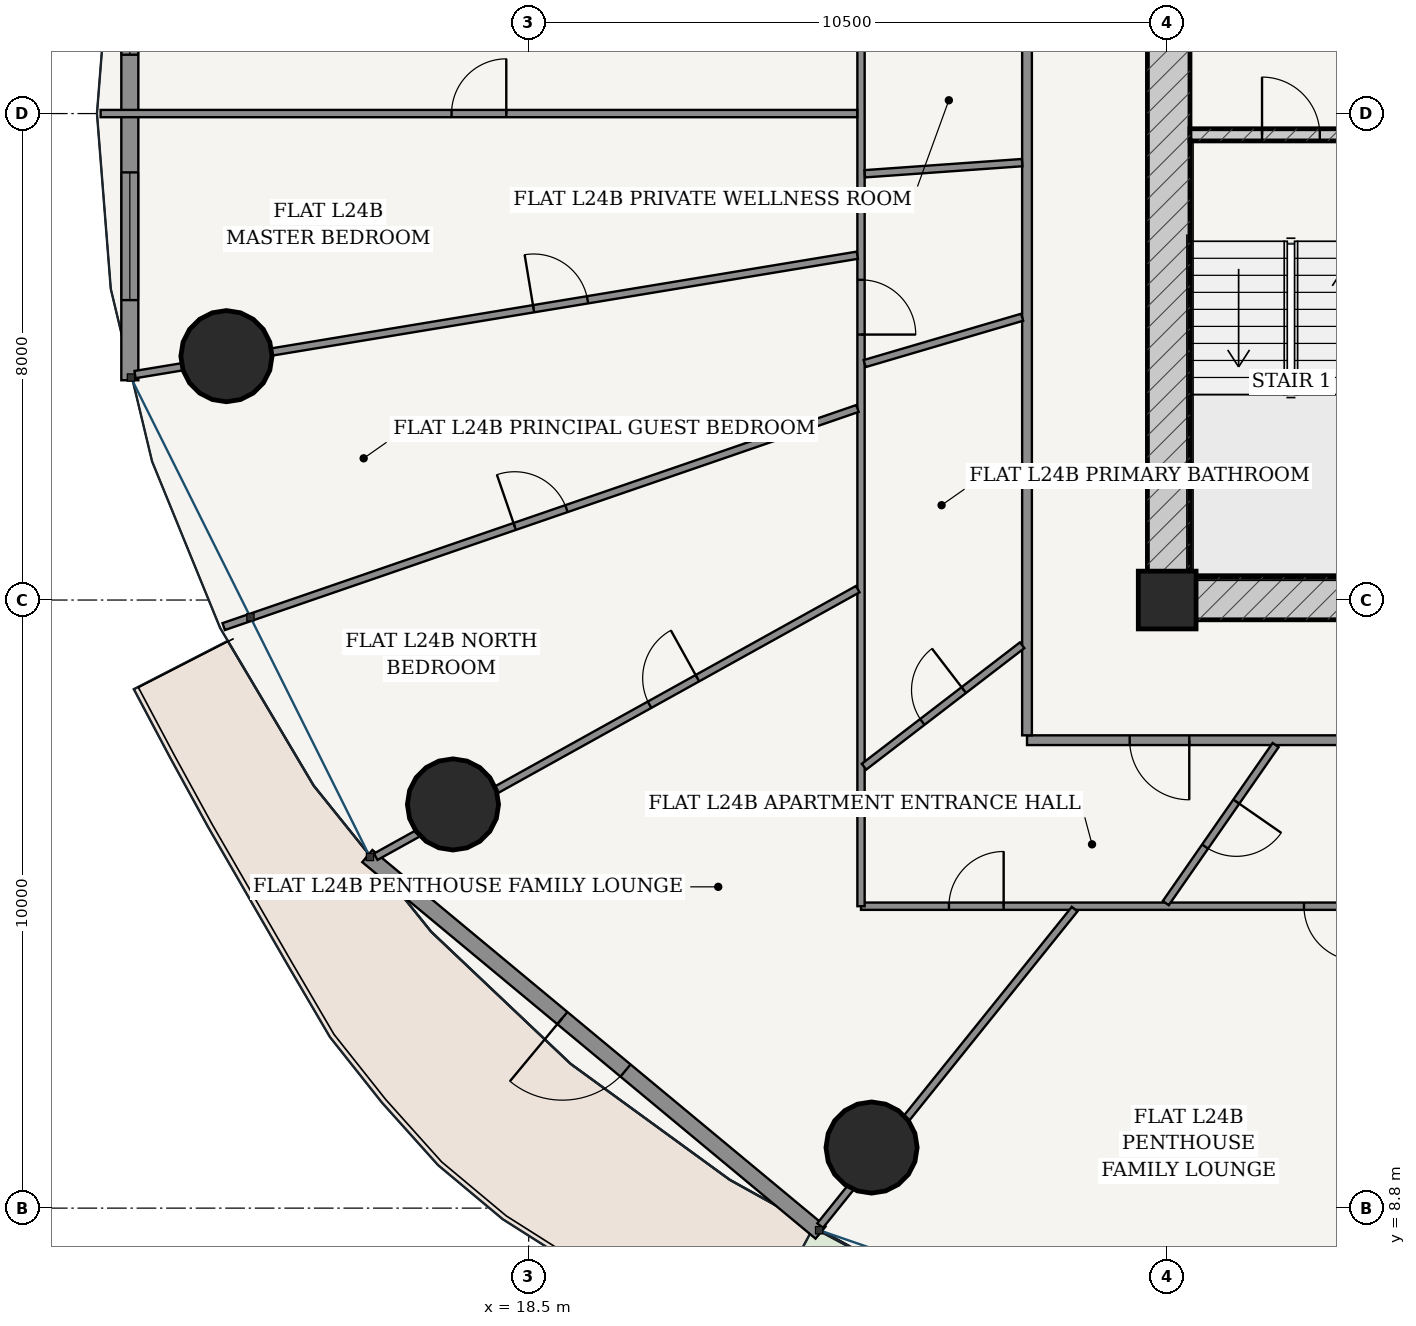
"""IFC4 building model, lengths in metres.
Left out: names, types, materials, properties, quantities, classifications, styles, units other than length and angle.
Written with IfcOpenShell. Run it as: python <this file> out.ifc"""

import sys

from ifc_helpers import new_model, si_unit, direction, frame, frame_2d, origin, origin_2d, place, context, subcontext, project, spatial, rectangle, hollow_circle, extrude, source, transform, mapped, element, fill, save


model = new_model("IFC4")
c1 = context("Model", 3, precision=1e-05, world=origin(), true_north=direction((-0.2419218956, 0.970295726276)))
c2 = subcontext(c1, "Body", "Model", "MODEL_VIEW")
j1 = project(units=[si_unit("LENGTHUNIT", "METRE"), si_unit("PLANEANGLEUNIT", "RADIAN")], contexts=[c1])
p1 = place(None, origin())
s1 = spatial("IfcSite", under=j1, at=p1, CompositionType="ELEMENT")
p2 = place(p1, origin())
s2 = spatial("IfcBuilding", under=s1, at=p2, CompositionType="ELEMENT")
p3 = place(p2, frame((0.0, 0.0, 94.2)))
s3 = spatial("IfcBuildingStorey", under=s2, at=p3, CompositionType="ELEMENT", Elevation=94.2)
p4 = place(p3, frame((29.0, 18.8, 0.0), z_axis=(0.0, 0.0, 1.0), x_axis=(1.0, 0.0, 0.0)))
e1 = element("IfcColumn", 1, at=p4, inside=s3, PredefinedType="COLUMN", context=c2, shape_type="SweptSolid", body=[
    extrude(rectangle(XDim=0.95, YDim=0.95, at=origin_2d()), origin(), (0.0, 0.0, 1.0), 3.6),
])
p5 = place(p3, frame((28.675, 18.825, 0.0), z_axis=(0.0, 0.0, 1.0), x_axis=(1.0, 0.0, 0.0)))
e2 = element("IfcWall", 2, at=p5, inside=s3, PredefinedType="SHEAR", context=c2, shape_type="SweptSolid", body=[
    extrude(rectangle(XDim=18.65, YDim=0.7, at=frame_2d((9.325, 0.0))), origin(), (0.0, 0.0, 1.0), 3.325),
])
p6 = place(p5, frame((8.9, 0.0, 0.0)))
e3 = element("IfcOpeningElement", 3, at=p6, cuts=e2, PredefinedType="OPENING", context=c2, shape_type="SweptSolid", body=[
    extrude(rectangle(XDim=0.85, YDim=2.1, at=frame_2d((0.425, 1.05))), frame((0.0, 0.36, 0.0), z_axis=(0.0, -1.0, 0.0), x_axis=(1.0, 0.0, 0.0)), (0.0, 0.0, 1.0), 0.72),
])
p7 = place(p3, frame((29.025, 19.175, 0.0), z_axis=(0.0, 0.0, 1.0), x_axis=(0.0, 1.0, 0.0)))
e4 = element("IfcWall", 4, at=p7, inside=s3, PredefinedType="SHEAR", context=c2, shape_type="SweptSolid", body=[
    extrude(rectangle(XDim=15.25, YDim=0.7, at=frame_2d((7.625, 0.0))), origin(), (0.0, 0.0, 1.0), 3.325),
])
p8 = place(p7, frame((9.875, 0.0, 0.0)))
e5 = element("IfcOpeningElement", 5, at=p8, cuts=e4, PredefinedType="OPENING", context=c2, shape_type="SweptSolid", body=[
    extrude(rectangle(XDim=1.5, YDim=2.2, at=frame_2d((0.75, 1.1))), frame((0.0, 0.36, 0.0), z_axis=(0.0, -1.0, 0.0), x_axis=(1.0, 0.0, 0.0)), (0.0, 0.0, 1.0), 0.72),
])
p9 = place(p3, frame((29.375, 26.45, 0.0), z_axis=(0.0, 0.0, 1.0), x_axis=(1.0, 0.0, 0.0)))
e6 = element("IfcWall", 6, at=p9, inside=s3, PredefinedType="SOLIDWALL", context=c2, shape_type="SweptSolid", body=[
    extrude(rectangle(XDim=3.32, YDim=0.2, at=frame_2d((1.66, 0.0))), origin(), (0.0, 0.0, 1.0), 3.325),
])
p10 = place(p9, frame((1.185, 0.0, 0.0)))
e7 = element("IfcOpeningElement", 7, at=p10, cuts=e6, PredefinedType="OPENING", context=c2, shape_type="SweptSolid", body=[
    extrude(rectangle(XDim=0.95, YDim=2.15, at=frame_2d((0.475, 1.075))), frame((0.0, 0.11, 0.0), z_axis=(0.0, -1.0, 0.0), x_axis=(1.0, 0.0, 0.0)), (0.0, 0.0, 1.0), 0.22),
])
for number, where, z_axis, x_axis in (
    (8, (13.529, 22.81, 0.0), (0.0, 0.0, 1.0), (1.0, 0.0, 0.0)),
    (9, (17.255, 15.438, 0.0), (0.0, 0.0, 1.0), (1.0, 0.0, 0.0)),
    (10, (24.138, 9.796, 0.0), (0.0, 0.0, 1.0), (1.0, 0.0, 0.0)),
):
    element("IfcColumn", number, at=place(p3, frame(where, z_axis=z_axis, x_axis=x_axis)), inside=s3, PredefinedType="COLUMN", context=c2, shape_type="SweptSolid", body=[
        extrude(hollow_circle(Radius=0.75, WallThickness=0.045, at=origin_2d()), origin(), (0.0, 0.0, 1.0), 3.6),
    ])
p11 = place(p3, frame((11.94, 31.186, 0.0), z_axis=(0.0, 0.0, 1.0), x_axis=(0.0, -1.0, 0.0)))
e11 = element("IfcWall", 11, at=p11, inside=s3, PredefinedType="SOLIDWALL", context=c2, shape_type="SweptSolid", body=[
    extrude(rectangle(XDim=8.771, YDim=0.28, at=frame_2d((4.386, 0.0))), origin(), (0.0, 0.0, 1.0), 3.325),
])
p12 = place(p11, frame((1.318, 0.0, 0.85)))
e12 = element("IfcOpeningElement", 12, at=p12, cuts=e11, PredefinedType="OPENING", context=c2, shape_type="SweptSolid", body=[
    extrude(rectangle(XDim=2.1, YDim=1.95, at=frame_2d((1.05, 0.975))), frame((0.0, 0.15, 0.0), z_axis=(0.0, -1.0, 0.0), x_axis=(1.0, 0.0, 0.0)), (0.0, 0.0, 1.0), 0.3),
])
p13 = place(p11, frame((5.353, 0.0, 0.85)))
e13 = element("IfcOpeningElement", 13, at=p13, cuts=e11, PredefinedType="OPENING", context=c2, shape_type="SweptSolid", body=[
    extrude(rectangle(XDim=2.1, YDim=1.95, at=frame_2d((1.05, 0.975))), frame((0.0, 0.15, 0.0), z_axis=(0.0, -1.0, 0.0), x_axis=(1.0, 0.0, 0.0)), (0.0, 0.0, 1.0), 0.3),
])
p14 = place(p3, frame((15.846, 14.59, 0.0), z_axis=(0.0, 0.0, 1.0), x_axis=(0.769254958887, -0.638941944333, 0.0)))
e14 = element("IfcWall", 14, at=p14, inside=s3, PredefinedType="SOLIDWALL", context=c2, shape_type="SweptSolid", body=[
    extrude(rectangle(XDim=9.69, YDim=0.26, at=frame_2d((4.845, 0.0))), origin(), (0.0, 0.0, 1.0), 3.325),
])
p15 = place(p14, frame((4.17, 0.0, 0.0)))
e15 = element("IfcOpeningElement", 15, at=p15, cuts=e14, PredefinedType="OPENING", context=c2, shape_type="SweptSolid", body=[
    extrude(rectangle(XDim=1.35, YDim=2.2, at=frame_2d((0.675, 1.1))), frame((0.0, 0.14, 0.0), z_axis=(0.0, -1.0, 0.0), x_axis=(1.0, 0.0, 0.0)), (0.0, 0.0, 1.0), 0.28),
])
p16 = place(p3, frame((26.695, 16.495, 0.0), z_axis=(0.0, 0.0, 1.0), x_axis=(1.0, 0.0, 0.0)))
e16 = element("IfcWall", 16, at=p16, inside=s3, PredefinedType="PARTITIONING", context=c2, shape_type="SweptSolid", body=[
    extrude(rectangle(XDim=22.61, YDim=0.16, at=frame_2d((11.305, 0.0))), origin(), (0.0, 0.0, 1.0), 2.767),
])
p17 = place(p16, frame((1.688, 0.0, 0.0)))
e17 = element("IfcOpeningElement", 17, at=p17, cuts=e16, PredefinedType="OPENING", context=c2, shape_type="SweptSolid", body=[
    extrude(rectangle(XDim=0.98, YDim=2.2, at=frame_2d((0.49, 1.1))), frame((0.0, 0.09, 0.0), z_axis=(0.0, -1.0, 0.0), x_axis=(1.0, 0.0, 0.0)), (0.0, 0.0, 1.0), 0.18),
])
p18 = place(p16, frame((16.137, 0.0, 0.0)))
e18 = element("IfcOpeningElement", 18, at=p18, cuts=e16, PredefinedType="OPENING", context=c2, shape_type="SweptSolid", body=[
    extrude(rectangle(XDim=0.98, YDim=2.2, at=frame_2d((0.49, 1.1))), frame((0.0, 0.09, 0.0), z_axis=(0.0, -1.0, 0.0), x_axis=(1.0, 0.0, 0.0)), (0.0, 0.0, 1.0), 0.18),
])
p19 = place(p3, frame((26.695, 16.575, 0.0), z_axis=(0.0, 0.0, 1.0), x_axis=(0.0, 1.0, 0.0)))
e19 = element("IfcWall", 19, at=p19, inside=s3, PredefinedType="PARTITIONING", context=c2, shape_type="SweptSolid", body=[
    extrude(rectangle(XDim=20.45, YDim=0.16, at=frame_2d((10.225, 0.0))), origin(), (0.0, 0.0, 1.0), 2.767),
])
p20 = place(p3, frame((34.777, 13.765, 0.0), z_axis=(0.0, 0.0, 1.0), x_axis=(-1.0, 0.0, 0.0)))
e20 = element("IfcWall", 20, at=p20, inside=s3, PredefinedType="PARTITIONING", context=c2, shape_type="SweptSolid", body=[
    extrude(rectangle(XDim=10.812, YDim=0.12, at=frame_2d((5.406, 0.0))), origin(), (0.0, 0.0, 1.0), 2.767),
])
p21 = place(p20, frame((8.466, 0.0, 0.0)))
e21 = element("IfcOpeningElement", 21, at=p21, cuts=e20, PredefinedType="OPENING", context=c2, shape_type="SweptSolid", body=[
    extrude(rectangle(XDim=0.9, YDim=2.15, at=frame_2d((0.45, 1.075))), frame((0.0, 0.07, 0.0), z_axis=(0.0, -1.0, 0.0), x_axis=(1.0, 0.0, 0.0)), (0.0, 0.0, 1.0), 0.14),
])
p22 = place(p20, frame((2.628, 0.0, 0.0)))
e22 = element("IfcOpeningElement", 22, at=p22, cuts=e20, PredefinedType="OPENING", context=c2, shape_type="SweptSolid", body=[
    extrude(rectangle(XDim=0.9, YDim=2.15, at=frame_2d((0.45, 1.075))), frame((0.0, 0.07, 0.0), z_axis=(0.0, -1.0, 0.0), x_axis=(1.0, 0.0, 0.0)), (0.0, 0.0, 1.0), 0.14),
])
p23 = place(p3, frame((23.965, 13.765, 0.0), z_axis=(0.0, 0.0, 1.0), x_axis=(0.0, 1.0, 0.0)))
e23 = element("IfcWall", 23, at=p23, inside=s3, PredefinedType="PARTITIONING", context=c2, shape_type="SweptSolid", body=[
    extrude(rectangle(XDim=20.725, YDim=0.12, at=frame_2d((10.362, 0.0))), origin(), (0.0, 0.0, 1.0), 2.767),
])
p24 = place(p23, frame((9.401, 0.0, 0.0)))
e24 = element("IfcOpeningElement", 24, at=p24, cuts=e23, PredefinedType="OPENING", context=c2, shape_type="SweptSolid", body=[
    extrude(rectangle(XDim=0.9, YDim=2.15, at=frame_2d((0.45, 1.075))), frame((0.0, 0.07, 0.0), z_axis=(0.0, -1.0, 0.0), x_axis=(1.0, 0.0, 0.0)), (0.0, 0.0, 1.0), 0.14),
])
p25 = place(p23, frame((18.157, 0.0, 0.0)))
e25 = element("IfcOpeningElement", 25, at=p25, cuts=e23, PredefinedType="OPENING", context=c2, shape_type="SweptSolid", body=[
    extrude(rectangle(XDim=0.86, YDim=2.15, at=frame_2d((0.43, 1.075))), frame((0.0, 0.07, 0.0), z_axis=(0.0, -1.0, 0.0), x_axis=(1.0, 0.0, 0.0)), (0.0, 0.0, 1.0), 0.14),
])
p26 = place(p23, frame((14.376, 0.0, 0.0)))
e26 = element("IfcOpeningElement", 26, at=p26, cuts=e23, PredefinedType="OPENING", context=c2, shape_type="SweptSolid", body=[
    extrude(rectangle(XDim=0.9, YDim=2.15, at=frame_2d((0.45, 1.075))), frame((0.0, 0.07, 0.0), z_axis=(0.0, -1.0, 0.0), x_axis=(1.0, 0.0, 0.0)), (0.0, 0.0, 1.0), 0.14),
])
p27 = place(p3, frame((23.903, 26.8, 0.0), z_axis=(0.0, 0.0, 1.0), x_axis=(-1.0, 0.0, 0.0)))
e27 = element("IfcWall", 27, at=p27, inside=s3, PredefinedType="PARTITIONING", context=c2, shape_type="SweptSolid", body=[
    extrude(rectangle(XDim=12.443, YDim=0.12, at=frame_2d((6.222, 0.0))), origin(), (0.0, 0.0, 1.0), 2.767),
])
p28 = place(p27, frame((5.771, 0.0, 0.0)))
e28 = element("IfcOpeningElement", 28, at=p28, cuts=e27, PredefinedType="OPENING", context=c2, shape_type="SweptSolid", body=[
    extrude(rectangle(XDim=0.9, YDim=2.15, at=frame_2d((0.45, 1.075))), frame((0.0, 0.07, 0.0), z_axis=(0.0, -1.0, 0.0), x_axis=(1.0, 0.0, 0.0)), (0.0, 0.0, 1.0), 0.14),
])
p29 = place(p3, frame((23.904, 24.47, 0.0), z_axis=(0.0, 0.0, 1.0), x_axis=(-0.986618264768, -0.163047231274, 0.0)))
e29 = element("IfcWall", 29, at=p29, inside=s3, PredefinedType="PARTITIONING", context=c2, shape_type="SweptSolid", body=[
    extrude(rectangle(XDim=12.039, YDim=0.12, at=frame_2d((6.02, 0.0))), origin(), (0.0, 0.0, 1.0), 2.767),
])
p30 = place(p29, frame((4.496, 0.0, 0.0)))
e30 = element("IfcOpeningElement", 30, at=p30, cuts=e29, PredefinedType="OPENING", context=c2, shape_type="SweptSolid", body=[
    extrude(rectangle(XDim=0.9, YDim=2.15, at=frame_2d((0.45, 1.075))), frame((0.0, 0.07, 0.0), z_axis=(0.0, -1.0, 0.0), x_axis=(1.0, 0.0, 0.0)), (0.0, 0.0, 1.0), 0.14),
])
p31 = place(p3, frame((23.906, 21.95, 0.0), z_axis=(0.0, 0.0, 1.0), x_axis=(-0.945573120726, -0.32540970078, 0.0)))
e31 = element("IfcWall", 31, at=p31, inside=s3, PredefinedType="PARTITIONING", context=c2, shape_type="SweptSolid", body=[
    extrude(rectangle(XDim=11.022, YDim=0.12, at=frame_2d((5.511, 0.0))), origin(), (0.0, 0.0, 1.0), 2.767),
])
p32 = place(p31, frame((5.061, 0.0, 0.0)))
e32 = element("IfcOpeningElement", 32, at=p32, cuts=e31, PredefinedType="OPENING", context=c2, shape_type="SweptSolid", body=[
    extrude(rectangle(XDim=0.9, YDim=2.15, at=frame_2d((0.45, 1.075))), frame((0.0, 0.07, 0.0), z_axis=(0.0, -1.0, 0.0), x_axis=(1.0, 0.0, 0.0)), (0.0, 0.0, 1.0), 0.14),
])
p33 = place(p3, frame((23.911, 18.979, 0.0), z_axis=(0.0, 0.0, 1.0), x_axis=(-0.874313476423, -0.485361664066, 0.0)))
e33 = element("IfcWall", 33, at=p33, inside=s3, PredefinedType="PARTITIONING", context=c2, shape_type="SweptSolid", body=[
    extrude(rectangle(XDim=9.066, YDim=0.12, at=frame_2d((4.533, 0.0))), origin(), (0.0, 0.0, 1.0), 2.767),
])
p34 = place(p33, frame((3.016, 0.0, 0.0)))
e34 = element("IfcOpeningElement", 34, at=p34, cuts=e33, PredefinedType="OPENING", context=c2, shape_type="SweptSolid", body=[
    extrude(rectangle(XDim=0.9, YDim=2.15, at=frame_2d((0.45, 1.075))), frame((0.0, 0.07, 0.0), z_axis=(0.0, -1.0, 0.0), x_axis=(1.0, 0.0, 0.0)), (0.0, 0.0, 1.0), 0.14),
])
p35 = place(p3, frame((27.478, 13.717, 0.0), z_axis=(0.0, 0.0, 1.0), x_axis=(-0.626707979732, -0.77925419995, 0.0)))
e35 = element("IfcWall", 35, at=p35, inside=s3, PredefinedType="PARTITIONING", context=c2, shape_type="SweptSolid", body=[
    extrude(rectangle(XDim=6.679, YDim=0.12, at=frame_2d((3.339, 0.0))), origin(), (0.0, 0.0, 1.0), 2.767),
])
p36 = place(p3, frame((26.615, 25.993, 0.0), z_axis=(0.0, 0.0, 1.0), x_axis=(-0.997500084777, -0.070665273433, 0.0)))
e36 = element("IfcWall", 36, at=p36, inside=s3, PredefinedType="PARTITIONING", context=c2, shape_type="SweptSolid", body=[
    extrude(rectangle(XDim=2.595, YDim=0.12, at=frame_2d((1.297, 0.0))), origin(), (0.0, 0.0, 1.0), 3.325),
])
p37 = place(p3, frame((26.615, 23.45, 0.0), z_axis=(0.0, 0.0, 1.0), x_axis=(-0.959338143787, -0.282259323806, 0.0)))
e37 = element("IfcWall", 37, at=p37, inside=s3, PredefinedType="PARTITIONING", context=c2, shape_type="SweptSolid", body=[
    extrude(rectangle(XDim=2.7, YDim=0.12, at=frame_2d((1.35, 0.0))), origin(), (0.0, 0.0, 1.0), 3.325),
])
p38 = place(p3, frame((26.615, 18.056, 0.0), z_axis=(0.0, 0.0, 1.0), x_axis=(-0.79311360735, -0.609073727751, 0.0)))
e38 = element("IfcWall", 38, at=p38, inside=s3, PredefinedType="PARTITIONING", context=c2, shape_type="SweptSolid", body=[
    extrude(rectangle(XDim=3.279, YDim=0.12, at=frame_2d((1.64, 0.0))), origin(), (0.0, 0.0, 1.0), 3.004),
])
p39 = place(p38, frame((1.21, 0.0, 0.0)))
e39 = element("IfcOpeningElement", 39, at=p39, cuts=e38, PredefinedType="OPENING", context=c2, shape_type="SweptSolid", body=[
    extrude(rectangle(XDim=0.86, YDim=2.15, at=frame_2d((0.43, 1.075))), frame((0.0, 0.07, 0.0), z_axis=(0.0, -1.0, 0.0), x_axis=(1.0, 0.0, 0.0)), (0.0, 0.0, 1.0), 0.14),
])
p40 = place(p3, frame((30.783, 16.415, 0.0), z_axis=(0.0, 0.0, 1.0), x_axis=(-0.570653089326, -0.821191239385, 0.0)))
e40 = element("IfcWall", 40, at=p40, inside=s3, PredefinedType="PARTITIONING", context=c2, shape_type="SweptSolid", body=[
    extrude(rectangle(XDim=3.165, YDim=0.12, at=frame_2d((1.583, 0.0))), origin(), (0.0, 0.0, 1.0), 3.004),
])
p41 = place(p40, frame((1.133, 0.0, 0.0)))
e41 = element("IfcOpeningElement", 41, at=p41, cuts=e40, PredefinedType="OPENING", context=c2, shape_type="SweptSolid", body=[
    extrude(rectangle(XDim=0.9, YDim=2.15, at=frame_2d((0.45, 1.075))), frame((0.0, 0.07, 0.0), z_axis=(0.0, -1.0, 0.0), x_axis=(1.0, 0.0, 0.0)), (0.0, 0.0, 1.0), 0.14),
])
m1 = source(origin(), c2, "Body", "SweptSolid", [
    extrude(rectangle(XDim=2.1, YDim=1.95, at=frame_2d((1.05, 0.975))), frame((0.0, 0.03, 0.0), z_axis=(0.0, -1.0, 0.0), x_axis=(1.0, 0.0, 0.0)), (0.0, 0.0, 1.0), 0.06),
])
p42 = place(p12, origin())
e42 = element("IfcWindow", 42, at=p42, inside=s3, PartitioningType="SINGLE_PANEL", PredefinedType="WINDOW", context=c2, shape_type="MappedRepresentation", body=[
    mapped(m1, transform((0.0, 0.0, 0.0), scale=1.0)),
])
fill(e12, e42)
p43 = place(p13, origin())
e43 = element("IfcWindow", 43, at=p43, inside=s3, PartitioningType="SINGLE_PANEL", PredefinedType="WINDOW", context=c2, shape_type="MappedRepresentation", body=[
    mapped(m1, transform((0.0, 0.0, 0.0), scale=1.0)),
])
fill(e13, e43)
m2 = source(origin(), c2, "Body", "SweptSolid", [
    extrude(rectangle(XDim=1.35, YDim=2.2, at=frame_2d((0.675, 1.1))), frame((0.0, 0.025, 0.0), z_axis=(0.0, -1.0, 0.0), x_axis=(1.0, 0.0, 0.0)), (0.0, 0.0, 1.0), 0.05),
])
p44 = place(p15, frame((1.35, 0.0, 0.0), z_axis=(0.0, 0.0, 1.0), x_axis=(-1.0, 0.0, 0.0)))
e44 = element("IfcDoor", 44, at=p44, inside=s3, OperationType="SINGLE_SWING_RIGHT", PredefinedType="DOOR", context=c2, shape_type="MappedRepresentation", body=[
    mapped(m2, transform((0.0, 0.0, 0.0), scale=1.0)),
])
fill(e15, e44)
m3 = source(origin(), c2, "Body", "SweptSolid", [
    extrude(rectangle(XDim=0.95, YDim=2.15, at=frame_2d((0.475, 1.075))), frame((0.0, 0.025, 0.0), z_axis=(0.0, -1.0, 0.0), x_axis=(1.0, 0.0, 0.0)), (0.0, 0.0, 1.0), 0.05),
])
p45 = place(p10, origin())
e45 = element("IfcDoor", 45, at=p45, inside=s3, OperationType="SINGLE_SWING_LEFT", PredefinedType="DOOR", context=c2, shape_type="MappedRepresentation", body=[
    mapped(m3, transform((0.0, 0.0, 0.0), scale=1.0)),
])
fill(e7, e45)
m4 = source(origin(), c2, "Body", "SweptSolid", [
    extrude(rectangle(XDim=0.98, YDim=2.2, at=frame_2d((0.49, 1.1))), frame((0.0, 0.025, 0.0), z_axis=(0.0, -1.0, 0.0), x_axis=(1.0, 0.0, 0.0)), (0.0, 0.0, 1.0), 0.05),
])
p46 = place(p17, frame((0.98, 0.0, 0.0), z_axis=(0.0, 0.0, 1.0), x_axis=(-1.0, 0.0, 0.0)))
e46 = element("IfcDoor", 46, at=p46, inside=s3, OperationType="SINGLE_SWING_LEFT", PredefinedType="DOOR", context=c2, shape_type="MappedRepresentation", body=[
    mapped(m4, transform((0.0, 0.0, 0.0), scale=1.0)),
])
fill(e17, e46)
m5 = source(origin(), c2, "Body", "SweptSolid", [
    extrude(rectangle(XDim=0.86, YDim=2.15, at=frame_2d((0.43, 1.075))), frame((0.0, 0.025, 0.0), z_axis=(0.0, -1.0, 0.0), x_axis=(1.0, 0.0, 0.0)), (0.0, 0.0, 1.0), 0.05),
])
p47 = place(p39, frame((0.86, 0.0, 0.0), z_axis=(0.0, 0.0, 1.0), x_axis=(-1.0, 0.0, 0.0)))
e47 = element("IfcDoor", 47, at=p47, inside=s3, OperationType="SINGLE_SWING_RIGHT", PredefinedType="DOOR", context=c2, shape_type="MappedRepresentation", body=[
    mapped(m5, transform((0.0, 0.0, 0.0), scale=1.0)),
])
fill(e39, e47)
m6 = source(origin(), c2, "Body", "SweptSolid", [
    extrude(rectangle(XDim=0.9, YDim=2.15, at=frame_2d((0.45, 1.075))), frame((0.0, 0.025, 0.0), z_axis=(0.0, -1.0, 0.0), x_axis=(1.0, 0.0, 0.0)), (0.0, 0.0, 1.0), 0.05),
])
p48 = place(p41, origin())
e48 = element("IfcDoor", 48, at=p48, inside=s3, OperationType="SINGLE_SWING_LEFT", PredefinedType="DOOR", context=c2, shape_type="MappedRepresentation", body=[
    mapped(m6, transform((0.0, 0.0, 0.0), scale=1.0)),
])
fill(e41, e48)
p49 = place(p21, frame((0.9, 0.0, 0.0), z_axis=(0.0, 0.0, 1.0), x_axis=(-1.0, 0.0, 0.0)))
e49 = element("IfcDoor", 49, at=p49, inside=s3, OperationType="SINGLE_SWING_RIGHT", PredefinedType="DOOR", context=c2, shape_type="MappedRepresentation", body=[
    mapped(m6, transform((0.0, 0.0, 0.0), scale=1.0)),
])
fill(e21, e49)
p50 = place(p22, origin())
e50 = element("IfcDoor", 50, at=p50, inside=s3, OperationType="SINGLE_SWING_LEFT", PredefinedType="DOOR", context=c2, shape_type="MappedRepresentation", body=[
    mapped(m6, transform((0.0, 0.0, 0.0), scale=1.0)),
])
fill(e22, e50)
p51 = place(p34, frame((0.9, 0.0, 0.0), z_axis=(0.0, 0.0, 1.0), x_axis=(-1.0, 0.0, 0.0)))
e51 = element("IfcDoor", 51, at=p51, inside=s3, OperationType="SINGLE_SWING_RIGHT", PredefinedType="DOOR", context=c2, shape_type="MappedRepresentation", body=[
    mapped(m6, transform((0.0, 0.0, 0.0), scale=1.0)),
])
fill(e34, e51)
p52 = place(p32, frame((0.9, 0.0, 0.0), z_axis=(0.0, 0.0, 1.0), x_axis=(-1.0, 0.0, 0.0)))
e52 = element("IfcDoor", 52, at=p52, inside=s3, OperationType="SINGLE_SWING_LEFT", PredefinedType="DOOR", context=c2, shape_type="MappedRepresentation", body=[
    mapped(m6, transform((0.0, 0.0, 0.0), scale=1.0)),
])
fill(e32, e52)
p53 = place(p24, frame((0.9, 0.0, 0.0), z_axis=(0.0, 0.0, 1.0), x_axis=(-1.0, 0.0, 0.0)))
e53 = element("IfcDoor", 53, at=p53, inside=s3, OperationType="SINGLE_SWING_RIGHT", PredefinedType="DOOR", context=c2, shape_type="MappedRepresentation", body=[
    mapped(m6, transform((0.0, 0.0, 0.0), scale=1.0)),
])
fill(e24, e53)
p54 = place(p30, frame((0.9, 0.0, 0.0), z_axis=(0.0, 0.0, 1.0), x_axis=(-1.0, 0.0, 0.0)))
e54 = element("IfcDoor", 54, at=p54, inside=s3, OperationType="SINGLE_SWING_LEFT", PredefinedType="DOOR", context=c2, shape_type="MappedRepresentation", body=[
    mapped(m6, transform((0.0, 0.0, 0.0), scale=1.0)),
])
fill(e30, e54)
p55 = place(p28, frame((0.9, 0.0, 0.0), z_axis=(0.0, 0.0, 1.0), x_axis=(-1.0, 0.0, 0.0)))
e55 = element("IfcDoor", 55, at=p55, inside=s3, OperationType="SINGLE_SWING_RIGHT", PredefinedType="DOOR", context=c2, shape_type="MappedRepresentation", body=[
    mapped(m6, transform((0.0, 0.0, 0.0), scale=1.0)),
])
fill(e28, e55)
save(model, sys.argv[1])
